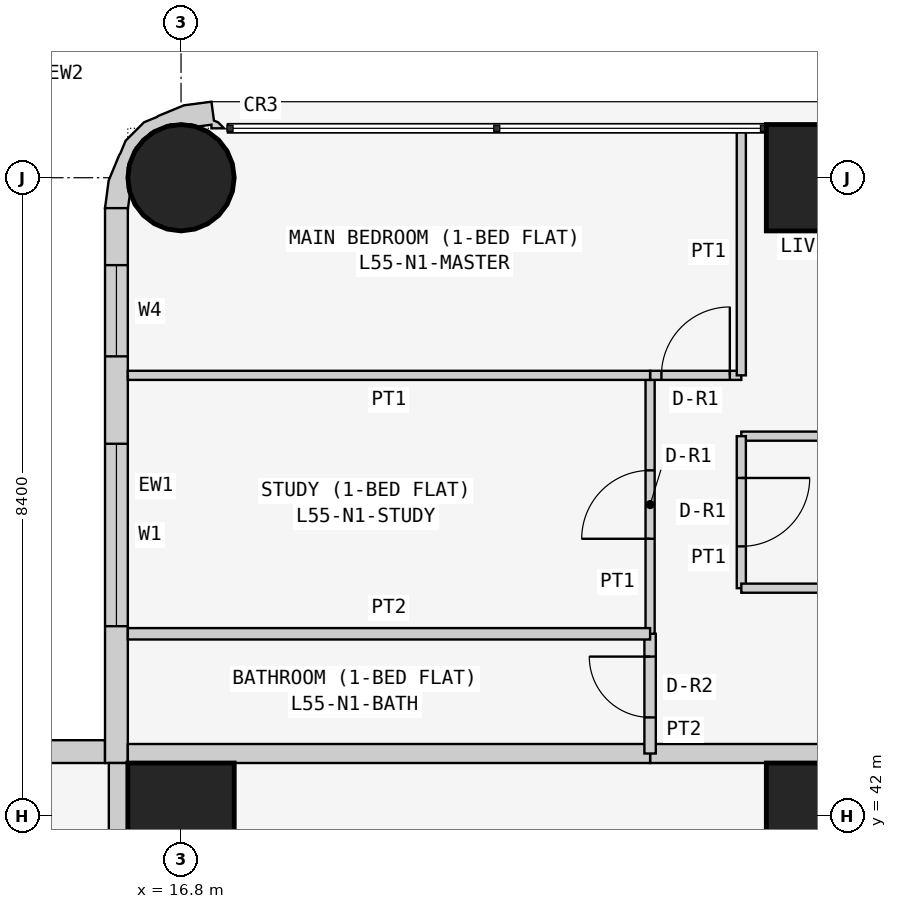
"""IFC4 building model, lengths in metres.
Left out: names, types, materials, properties, quantities, classifications, styles, units other than length and angle.
Written with IfcOpenShell. Run it as: python <this file> out.ifc"""

import sys

from ifc_helpers import new_model, si_unit, direction, frame, frame_2d, origin, origin_2d, place, context, subcontext, project, spatial, polyline, rectangle, circle, outline, extrude, element, fill, save


model = new_model("IFC4")
c1 = context("Model", 3, precision=1e-05, world=origin(), true_north=direction((0.0, 1.0)))
c2 = subcontext(c1, "Body", "Model", "MODEL_VIEW")
j1 = project(units=[si_unit("LENGTHUNIT", "METRE"), si_unit("PLANEANGLEUNIT", "RADIAN")], contexts=[c1])
p1 = place(None, origin())
s1 = spatial("IfcSite", under=j1, at=p1, CompositionType="ELEMENT")
p2 = place(p1, origin())
s2 = spatial("IfcBuilding", under=s1, at=p2, CompositionType="ELEMENT")
p3 = place(p2, frame((0.0, 0.0, 212.1)))
s3 = spatial("IfcBuildingStorey", under=s2, at=p3, CompositionType="ELEMENT", Elevation=212.1)
p4 = place(p3, frame((16.8, 42.0, 0.0), z_axis=(0.0, 0.0, 1.0), x_axis=(1.0, 0.0, 0.0)))
e1 = element("IfcColumn", 1, at=p4, inside=s3, PredefinedType="COLUMN", context=c2, shape_type="SweptSolid", body=[
    extrude(rectangle(XDim=1.4, YDim=1.4, at=origin_2d()), origin(), (0.0, 0.0, 1.0), 3.6),
])
p5 = place(p3, frame((16.8, 50.4, 0.0), z_axis=(0.0, 0.0, 1.0), x_axis=(1.0, 0.0, 0.0)))
e2 = element("IfcColumn", 2, at=p5, inside=s3, PredefinedType="COLUMN", context=c2, shape_type="SweptSolid", body=[
    extrude(circle(Radius=0.7, at=origin_2d()), origin(), (0.0, 0.0, 1.0), 3.6),
])
for number, where, z_axis, x_axis in (
    (3, (25.2, 42.0, 0.0), (0.0, 0.0, 1.0), (1.0, 0.0, 0.0)),
    (4, (25.2, 50.4, 0.0), (0.0, 0.0, 1.0), (1.0, 0.0, 0.0)),
):
    element("IfcColumn", number, at=place(p3, frame(where, z_axis=z_axis, x_axis=x_axis)), inside=s3, PredefinedType="COLUMN", context=c2, shape_type="SweptSolid", body=[
        extrude(rectangle(XDim=1.4, YDim=1.4, at=origin_2d()), origin(), (0.0, 0.0, 1.0), 3.6),
    ])
p6 = place(p3, frame((15.8, 42.85, 0.0), z_axis=(0.0, 0.0, 1.0), x_axis=(-1.0, 0.0, 0.0)))
e5 = element("IfcWall", 5, at=p6, inside=s3, PredefinedType="SOLIDWALL", context=c2, shape_type="SweptSolid", body=[
    extrude(rectangle(XDim=15.4, YDim=0.3, at=frame_2d((7.7, 0.0))), origin(), (0.0, 0.0, 1.0), 3.45),
])
p7 = place(p6, frame((1.2, 0.0, 0.9)))
e6 = element("IfcOpeningElement", 6, at=p7, cuts=e5, PredefinedType="OPENING", context=c2, shape_type="SweptSolid", body=[
    extrude(rectangle(XDim=1.8, YDim=1.5, at=frame_2d((0.9, 0.75))), frame((0.0, 0.16, 0.0), z_axis=(0.0, -1.0, 0.0), x_axis=(1.0, 0.0, 0.0)), (0.0, 0.0, 1.0), 0.32),
])
p8 = place(p6, frame((4.95, 0.0, 1.5)))
e7 = element("IfcOpeningElement", 7, at=p8, cuts=e5, PredefinedType="OPENING", context=c2, shape_type="SweptSolid", body=[
    extrude(rectangle(XDim=0.9, YDim=0.7, at=frame_2d((0.45, 0.35))), frame((0.0, 0.16, 0.0), z_axis=(0.0, -1.0, 0.0), x_axis=(1.0, 0.0, 0.0)), (0.0, 0.0, 1.0), 0.32),
])
p9 = place(p6, frame((8.5, 0.0, 0.9)))
e8 = element("IfcOpeningElement", 8, at=p9, cuts=e5, PredefinedType="OPENING", context=c2, shape_type="SweptSolid", body=[
    extrude(rectangle(XDim=1.8, YDim=1.5, at=frame_2d((0.9, 0.75))), frame((0.0, 0.16, 0.0), z_axis=(0.0, -1.0, 0.0), x_axis=(1.0, 0.0, 0.0)), (0.0, 0.0, 1.0), 0.32),
])
p10 = place(p6, frame((12.5, 0.0, 0.0)))
e9 = element("IfcOpeningElement", 9, at=p10, cuts=e5, PredefinedType="OPENING", context=c2, shape_type="SweptSolid", body=[
    extrude(rectangle(XDim=0.9, YDim=2.4, at=frame_2d((0.45, 1.2))), frame((0.0, 0.16, 0.0), z_axis=(0.0, -1.0, 0.0), x_axis=(1.0, 0.0, 0.0)), (0.0, 0.0, 1.0), 0.32),
])
p11 = place(p6, frame((13.5, 0.0, 0.9)))
e10 = element("IfcOpeningElement", 10, at=p11, cuts=e5, PredefinedType="OPENING", context=c2, shape_type="SweptSolid", body=[
    extrude(rectangle(XDim=1.2, YDim=1.5, at=frame_2d((0.6, 0.75))), frame((0.0, 0.16, 0.0), z_axis=(0.0, -1.0, 0.0), x_axis=(1.0, 0.0, 0.0)), (0.0, 0.0, 1.0), 0.32),
])
p12 = place(p3, frame((15.95, 50.0, 0.0), z_axis=(0.0, 0.0, 1.0), x_axis=(0.0, -1.0, 0.0)))
e11 = element("IfcWall", 11, at=p12, inside=s3, PredefinedType="SOLIDWALL", context=c2, shape_type="SweptSolid", body=[
    extrude(rectangle(XDim=7.3, YDim=0.3, at=frame_2d((3.65, 0.0))), origin(), (0.0, 0.0, 1.0), 3.45),
])
p13 = place(p12, frame((3.1, 0.0, 0.9)))
e12 = element("IfcOpeningElement", 12, at=p13, cuts=e11, PredefinedType="OPENING", context=c2, shape_type="SweptSolid", body=[
    extrude(rectangle(XDim=2.4, YDim=1.5, at=frame_2d((1.2, 0.75))), frame((0.0, 0.16, 0.0), z_axis=(0.0, -1.0, 0.0), x_axis=(1.0, 0.0, 0.0)), (0.0, 0.0, 1.0), 0.32),
])
p14 = place(p12, frame((0.75, 0.0, 0.9)))
e13 = element("IfcOpeningElement", 13, at=p14, cuts=e11, PredefinedType="OPENING", context=c2, shape_type="SweptSolid", body=[
    extrude(rectangle(XDim=1.2, YDim=1.5, at=frame_2d((0.6, 0.75))), frame((0.0, 0.16, 0.0), z_axis=(0.0, -1.0, 0.0), x_axis=(1.0, 0.0, 0.0)), (0.0, 0.0, 1.0), 0.32),
])
p15 = place(p3, frame((17.312, 50.988, 0.0), z_axis=(0.0, 0.0, 1.0), x_axis=(-0.439933741929, 0.898030234854, 0.0)))
e14 = element("IfcWall", 14, at=p15, inside=s3, PredefinedType="SOLIDWALL", context=c2, shape_type="SweptSolid", body=[
    extrude(outline(polyline([(0.138, -0.039), (0.182, -0.0), (0.419, -0.08), (0.536, 0.266), (0.559, 0.631), (0.555, 0.651), (0.566, 0.836), (0.456, 1.159), (0.333, 1.298), (0.324, 1.316), (0.082, 1.591), (-0.222, 1.793), (-0.39, 1.541), (-0.372, 1.532), (-0.195, 1.414), (-0.12, 1.41), (0.131, 1.287), (0.315, 1.078), (0.406, 0.814), (0.388, 0.536), (0.265, 0.285), (0.209, 0.236), (0.148, 0.053), (0.105, 0.074), (0.032, -0.076), (0.138, -0.039)])), origin(), (0.0, 0.0, 1.0), 3.45),
])
p16 = place(p3, frame((22.971, 42.825, 0.0), z_axis=(0.0, 0.0, 1.0), x_axis=(1.0, 0.0, 0.0)))
e15 = element("IfcWall", 15, at=p16, inside=s3, PredefinedType="PARTITIONING", context=c2, shape_type="SweptSolid", body=[
    extrude(rectangle(XDim=6.429, YDim=0.25, at=frame_2d((3.214, 0.0))), origin(), (0.0, 0.0, 1.0), 3.45),
])
p17 = place(p16, frame((4.929, 0.0, 0.0)))
e16 = element("IfcOpeningElement", 16, at=p17, cuts=e15, PredefinedType="OPENING", context=c2, shape_type="SweptSolid", body=[
    extrude(rectangle(XDim=1.0, YDim=2.1, at=frame_2d((0.5, 1.05))), frame((0.0, 0.135, 0.0), z_axis=(0.0, -1.0, 0.0), x_axis=(1.0, 0.0, 0.0)), (0.0, 0.0, 1.0), 0.27),
])
p18 = place(p3, frame((16.1, 42.825, 0.0), z_axis=(0.0, 0.0, 1.0), x_axis=(1.0, 0.0, 0.0)))
e17 = element("IfcWall", 17, at=p18, inside=s3, PredefinedType="PARTITIONING", context=c2, shape_type="SweptSolid", body=[
    extrude(rectangle(XDim=6.871, YDim=0.25, at=frame_2d((3.436, 0.0))), origin(), (0.0, 0.0, 1.0), 3.45),
])
p19 = place(p3, frame((15.975, 36.229, 0.0), z_axis=(0.0, 0.0, 1.0), x_axis=(0.0, 1.0, 0.0)))
e18 = element("IfcWall", 18, at=p19, inside=s3, PredefinedType="PARTITIONING", context=c2, shape_type="SweptSolid", body=[
    extrude(rectangle(XDim=6.471, YDim=0.25, at=frame_2d((3.235, 0.0))), origin(), (0.0, 0.0, 1.0), 3.45),
])
p20 = place(p3, frame((29.4, 47.0, 0.0), z_axis=(0.0, 0.0, 1.0), x_axis=(-1.0, 0.0, 0.0)))
e19 = element("IfcWall", 19, at=p20, inside=s3, PredefinedType="PARTITIONING", context=c2, shape_type="SweptSolid", body=[
    extrude(rectangle(XDim=5.229, YDim=0.12, at=frame_2d((2.615, 0.0))), origin(), (0.0, 0.0, 1.0), 3.45),
])
p21 = place(p3, frame((24.171, 47.0, 0.0), z_axis=(0.0, 0.0, 1.0), x_axis=(0.0, -1.0, 0.0)))
e20 = element("IfcWall", 20, at=p21, inside=s3, PredefinedType="PARTITIONING", context=c2, shape_type="SweptSolid", body=[
    extrude(rectangle(XDim=2.0, YDim=0.12, at=frame_2d((1.0, 0.0))), origin(), (0.0, 0.0, 1.0), 3.45),
])
p22 = place(p21, frame((0.55, 0.0, 0.0)))
e21 = element("IfcOpeningElement", 21, at=p22, cuts=e20, PredefinedType="OPENING", context=c2, shape_type="SweptSolid", body=[
    extrude(rectangle(XDim=0.9, YDim=2.1, at=frame_2d((0.45, 1.05))), frame((0.0, 0.07, 0.0), z_axis=(0.0, -1.0, 0.0), x_axis=(1.0, 0.0, 0.0)), (0.0, 0.0, 1.0), 0.14),
])
p23 = place(p3, frame((24.171, 45.0, 0.0), z_axis=(0.0, 0.0, 1.0), x_axis=(1.0, 0.0, 0.0)))
e22 = element("IfcWall", 22, at=p23, inside=s3, PredefinedType="PARTITIONING", context=c2, shape_type="SweptSolid", body=[
    extrude(rectangle(XDim=5.229, YDim=0.12, at=frame_2d((2.615, 0.0))), origin(), (0.0, 0.0, 1.0), 3.45),
])
p24 = place(p3, frame((22.971, 42.825, 0.0), z_axis=(0.0, 0.0, 1.0), x_axis=(0.0, 1.0, 0.0)))
e23 = element("IfcWall", 23, at=p24, inside=s3, PredefinedType="PARTITIONING", context=c2, shape_type="SweptSolid", body=[
    extrude(rectangle(XDim=1.575, YDim=0.15, at=frame_2d((0.788, 0.0))), origin(), (0.0, 0.0, 1.0), 3.45),
])
p25 = place(p24, frame((0.475, 0.0, 0.0)))
e24 = element("IfcOpeningElement", 24, at=p25, cuts=e23, PredefinedType="OPENING", context=c2, shape_type="SweptSolid", body=[
    extrude(rectangle(XDim=0.8, YDim=2.1, at=frame_2d((0.4, 1.05))), frame((0.0, 0.085, 0.0), z_axis=(0.0, -1.0, 0.0), x_axis=(1.0, 0.0, 0.0)), (0.0, 0.0, 1.0), 0.17),
])
p26 = place(p3, frame((22.971, 44.4, 0.0), z_axis=(0.0, 0.0, 1.0), x_axis=(0.0, 1.0, 0.0)))
e25 = element("IfcWall", 25, at=p26, inside=s3, PredefinedType="PARTITIONING", context=c2, shape_type="SweptSolid", body=[
    extrude(rectangle(XDim=3.4, YDim=0.12, at=frame_2d((1.7, 0.0))), origin(), (0.0, 0.0, 1.0), 3.45),
])
p27 = place(p26, frame((1.25, 0.0, 0.0)))
e26 = element("IfcOpeningElement", 26, at=p27, cuts=e25, PredefinedType="OPENING", context=c2, shape_type="SweptSolid", body=[
    extrude(rectangle(XDim=0.9, YDim=2.1, at=frame_2d((0.45, 1.05))), frame((0.0, 0.07, 0.0), z_axis=(0.0, -1.0, 0.0), x_axis=(1.0, 0.0, 0.0)), (0.0, 0.0, 1.0), 0.14),
])
p28 = place(p3, frame((22.971, 47.8, 0.0), z_axis=(0.0, 0.0, 1.0), x_axis=(1.0, 0.0, 0.0)))
e27 = element("IfcWall", 27, at=p28, inside=s3, PredefinedType="PARTITIONING", context=c2, shape_type="SweptSolid", body=[
    extrude(rectangle(XDim=1.2, YDim=0.12, at=frame_2d((0.6, 0.0))), origin(), (0.0, 0.0, 1.0), 3.45),
])
p29 = place(p28, frame((0.149, 0.0, 0.0)))
e28 = element("IfcOpeningElement", 28, at=p29, cuts=e27, PredefinedType="OPENING", context=c2, shape_type="SweptSolid", body=[
    extrude(rectangle(XDim=0.9, YDim=2.1, at=frame_2d((0.45, 1.05))), frame((0.0, 0.07, 0.0), z_axis=(0.0, -1.0, 0.0), x_axis=(1.0, 0.0, 0.0)), (0.0, 0.0, 1.0), 0.14),
])
p30 = place(p3, frame((24.171, 47.8, 0.0), z_axis=(0.0, 0.0, 1.0), x_axis=(0.0, 1.0, 0.0)))
e29 = element("IfcWall", 29, at=p30, inside=s3, PredefinedType="PARTITIONING", context=c2, shape_type="SweptSolid", body=[
    extrude(rectangle(XDim=3.25, YDim=0.12, at=frame_2d((1.625, 0.0))), origin(), (0.0, 0.0, 1.0), 3.45),
])
p31 = place(p3, frame((22.971, 44.4, 0.0), z_axis=(0.0, 0.0, 1.0), x_axis=(-1.0, 0.0, 0.0)))
e30 = element("IfcWall", 30, at=p31, inside=s3, PredefinedType="PARTITIONING", context=c2, shape_type="SweptSolid", body=[
    extrude(rectangle(XDim=6.871, YDim=0.15, at=frame_2d((3.436, 0.0))), origin(), (0.0, 0.0, 1.0), 3.45),
])
p32 = place(p3, frame((22.971, 47.8, 0.0), z_axis=(0.0, 0.0, 1.0), x_axis=(-1.0, 0.0, 0.0)))
e31 = element("IfcWall", 31, at=p32, inside=s3, PredefinedType="PARTITIONING", context=c2, shape_type="SweptSolid", body=[
    extrude(rectangle(XDim=6.871, YDim=0.12, at=frame_2d((3.436, 0.0))), origin(), (0.0, 0.0, 1.0), 3.45),
])
p33 = place(p13, origin())
e32 = element("IfcWindow", 32, at=p33, inside=s3, PartitioningType="SINGLE_PANEL", PredefinedType="WINDOW", context=c2, shape_type="SweptSolid", body=[
    extrude(rectangle(XDim=2.4, YDim=1.5, at=frame_2d((1.2, 0.75))), frame((0.0, 0.03, 0.0), z_axis=(0.0, -1.0, 0.0), x_axis=(1.0, 0.0, 0.0)), (0.0, 0.0, 1.0), 0.06),
])
fill(e12, e32)
p34 = place(p14, origin())
e33 = element("IfcWindow", 33, at=p34, inside=s3, PartitioningType="SINGLE_PANEL", PredefinedType="WINDOW", context=c2, shape_type="SweptSolid", body=[
    extrude(rectangle(XDim=1.2, YDim=1.5, at=frame_2d((0.6, 0.75))), frame((0.0, 0.03, 0.0), z_axis=(0.0, -1.0, 0.0), x_axis=(1.0, 0.0, 0.0)), (0.0, 0.0, 1.0), 0.06),
])
fill(e13, e33)
p35 = place(p22, origin())
e34 = element("IfcDoor", 34, at=p35, inside=s3, OperationType="SINGLE_SWING_LEFT", PredefinedType="DOOR", context=c2, shape_type="SweptSolid", body=[
    extrude(rectangle(XDim=0.9, YDim=2.1, at=frame_2d((0.45, 1.05))), frame((0.0, 0.025, 0.0), z_axis=(0.0, -1.0, 0.0), x_axis=(1.0, 0.0, 0.0)), (0.0, 0.0, 1.0), 0.05),
])
fill(e21, e34)
p36 = place(p25, origin())
e35 = element("IfcDoor", 35, at=p36, inside=s3, OperationType="SINGLE_SWING_RIGHT", PredefinedType="DOOR", context=c2, shape_type="SweptSolid", body=[
    extrude(rectangle(XDim=0.8, YDim=2.1, at=frame_2d((0.4, 1.05))), frame((0.0, 0.025, 0.0), z_axis=(0.0, -1.0, 0.0), x_axis=(1.0, 0.0, 0.0)), (0.0, 0.0, 1.0), 0.05),
])
fill(e24, e35)
p37 = place(p27, origin())
e36 = element("IfcDoor", 36, at=p37, inside=s3, OperationType="SINGLE_SWING_LEFT", PredefinedType="DOOR", context=c2, shape_type="SweptSolid", body=[
    extrude(rectangle(XDim=0.9, YDim=2.1, at=frame_2d((0.45, 1.05))), frame((0.0, 0.025, 0.0), z_axis=(0.0, -1.0, 0.0), x_axis=(1.0, 0.0, 0.0)), (0.0, 0.0, 1.0), 0.05),
])
fill(e26, e36)
p38 = place(p29, origin())
e37 = element("IfcDoor", 37, at=p38, inside=s3, OperationType="SINGLE_SWING_RIGHT", PredefinedType="DOOR", context=c2, shape_type="SweptSolid", body=[
    extrude(rectangle(XDim=0.9, YDim=2.1, at=frame_2d((0.45, 1.05))), frame((0.0, 0.025, 0.0), z_axis=(0.0, -1.0, 0.0), x_axis=(1.0, 0.0, 0.0)), (0.0, 0.0, 1.0), 0.05),
])
fill(e28, e37)
save(model, sys.argv[1])
